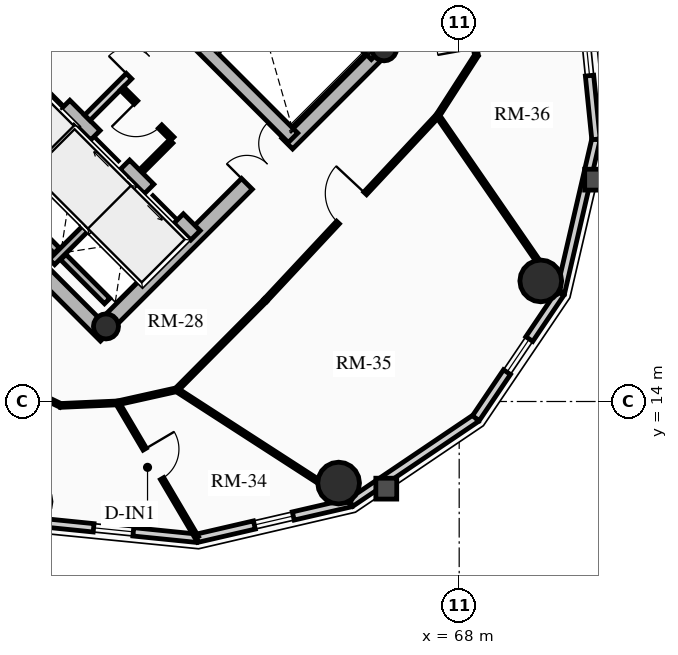
"""IFC4 building model, lengths in metres.
Left out: names, types, materials, properties, quantities, classifications, styles, units other than length and angle.
Written with IfcOpenShell. Run it as: python <this file> out.ifc"""

import sys

from ifc_helpers import new_model, si_unit, direction, frame, frame_2d, origin, origin_2d, place, context, subcontext, project, spatial, rectangle, circle, hollow_circle, extrude, source, transform, mapped, element, fill, save


model = new_model("IFC4")
c1 = context("Model", 3, precision=1e-05, world=origin(), true_north=direction((0.0, 1.0)))
c2 = subcontext(c1, "Body", "Model", "MODEL_VIEW")
j1 = project(units=[si_unit("LENGTHUNIT", "METRE"), si_unit("PLANEANGLEUNIT", "RADIAN")], contexts=[c1])
p1 = place(None, origin())
s1 = spatial("IfcSite", under=j1, at=p1, CompositionType="ELEMENT")
p2 = place(p1, origin())
s2 = spatial("IfcBuilding", under=s1, at=p2, CompositionType="ELEMENT")
p3 = place(p2, frame((0.0, 0.0, 229.25)))
s3 = spatial("IfcBuildingStorey", under=s2, at=p3, CompositionType="ELEMENT", Elevation=229.25)
for number, where, z_axis, x_axis in (
    (1, (58.702, 15.732, 0.0), (0.0, 0.0, 1.0), (-0.707, 0.707, 0.0)),
    (2, (66.268, 23.298, 0.0), (0.0, 0.0, 1.0), (-0.707, 0.707, 0.0)),
):
    element("IfcWall", number, at=place(p3, frame(where, z_axis=z_axis, x_axis=x_axis)), inside=s3, PredefinedType="SHEAR", context=c2, shape_type="SweptSolid", body=[
        extrude(rectangle(XDim=14.1, YDim=0.4, at=frame_2d((7.05, 0.0))), origin(), (0.0, 0.0, 1.0), 3.2),
    ])
p4 = place(p3, frame((58.561, 15.873, 0.0), z_axis=(0.0, 0.0, 1.0), x_axis=(0.707106781187, 0.707106781187, 0.0)))
e3 = element("IfcWall", 3, at=p4, inside=s3, PredefinedType="SHEAR", context=c2, shape_type="SweptSolid", body=[
    extrude(rectangle(XDim=10.7, YDim=0.4, at=frame_2d((5.35, 0.0))), origin(), (0.0, 0.0, 1.0), 3.2),
])
m1 = source(origin(), c2, "Body", "SweptSolid", [
    extrude(rectangle(XDim=1.5, YDim=2.02, at=frame_2d((0.75, 1.01))), frame((0.0, 0.21, 0.0), z_axis=(0.0, -1.0, 0.0), x_axis=(1.0, 0.0, 0.0)), (0.0, 0.0, 1.0), 0.42),
])
p5 = place(p4, frame((5.45, 0.0, 0.0)))
e4 = element("IfcOpeningElement", 4, at=p5, cuts=e3, PredefinedType="OPENING", context=c2, shape_type="MappedRepresentation", body=[
    mapped(m1, transform((0.0, 0.0, 0.0), x_axis=(1.0, 0.0, 0.0), y_axis=(0.0, 1.0, 0.0), z_axis=(0.0, 0.0, 1.0), scale=1.0)),
])
p6 = place(p3, frame((61.06, 18.373, 0.0), z_axis=(0.0, 0.0, 1.0), x_axis=(-0.707106781187, 0.707106781187, 0.0)))
e5 = element("IfcWall", 5, at=p6, inside=s3, PredefinedType="SHEAR", context=c2, shape_type="SweptSolid", body=[
    extrude(rectangle(XDim=13.7, YDim=0.35, at=frame_2d((6.85, 0.0))), origin(), (0.0, 0.0, 1.0), 3.2),
])
m2 = source(origin(), c2, "Body", "SweptSolid", [
    extrude(rectangle(XDim=1.1, YDim=2.015, at=frame_2d((0.55, 1.007))), frame((0.0, 0.185, 0.0), z_axis=(0.0, -1.0, 0.0), x_axis=(1.0, 0.0, 0.0)), (0.0, 0.0, 1.0), 0.37),
])
p7 = place(p6, frame((4.85, 0.0, 0.0)))
e6 = element("IfcOpeningElement", 6, at=p7, cuts=e5, PredefinedType="OPENING", context=c2, shape_type="MappedRepresentation", body=[
    mapped(m2, transform((0.0, 0.0, 0.0), x_axis=(1.0, 0.0, 0.0), y_axis=(0.0, 1.0, 0.0), z_axis=(0.0, 0.0, 1.0), scale=1.0)),
])
p8 = place(p6, frame((0.625, 0.0, 0.0)))
e7 = element("IfcOpeningElement", 7, at=p8, cuts=e5, PredefinedType="OPENING", context=c2, shape_type="MappedRepresentation", body=[
    mapped(m2, transform((0.0, 0.0, 0.0), x_axis=(1.0, 0.0, 0.0), y_axis=(0.0, 1.0, 0.0), z_axis=(0.0, 0.0, 1.0), scale=1.0)),
])
p9 = place(p6, frame((2.625, 0.0, 0.0)))
e8 = element("IfcOpeningElement", 8, at=p9, cuts=e5, PredefinedType="OPENING", context=c2, shape_type="MappedRepresentation", body=[
    mapped(m2, transform((0.0, 0.0, 0.0), x_axis=(1.0, 0.0, 0.0), y_axis=(0.0, 1.0, 0.0), z_axis=(0.0, 0.0, 1.0), scale=1.0)),
])
m3 = source(origin(), c2, "Body", "SweptSolid", [
    extrude(rectangle(XDim=1.15, YDim=2.02, at=frame_2d((0.575, 1.01))), frame((0.0, 0.185, 0.0), z_axis=(0.0, -1.0, 0.0), x_axis=(1.0, 0.0, 0.0)), (0.0, 0.0, 1.0), 0.37),
])
p10 = place(p6, frame((7.27, 0.0, 0.0)))
e9 = element("IfcOpeningElement", 9, at=p10, cuts=e5, PredefinedType="OPENING", context=c2, shape_type="MappedRepresentation", body=[
    mapped(m3, transform((0.0, 0.0, 0.0), x_axis=(1.0, 0.0, 0.0), y_axis=(0.0, 1.0, 0.0), z_axis=(0.0, 0.0, 1.0), scale=1.0)),
])
p11 = place(p3, frame((63.627, 20.94, 0.0), z_axis=(0.0, 0.0, 1.0), x_axis=(-0.707119496762, 0.707094065383, 0.0)))
e10 = element("IfcWall", 10, at=p11, inside=s3, PredefinedType="SHEAR", context=c2, shape_type="SweptSolid", body=[
    extrude(rectangle(XDim=9.6, YDim=0.35, at=frame_2d((4.8, 0.0))), origin(), (0.0, 0.0, 1.0), 3.2),
])
p12 = place(p11, frame((5.28, 0.0, 0.0)))
e11 = element("IfcOpeningElement", 11, at=p12, cuts=e10, PredefinedType="OPENING", context=c2, shape_type="MappedRepresentation", body=[
    mapped(m3, transform((0.0, 0.0, 0.0), x_axis=(1.0, 0.0, 0.0), y_axis=(0.0, 1.0, 0.0), z_axis=(0.0, 0.0, 1.0), scale=1.0)),
])
p13 = place(p3, frame((65.812, 23.125, 0.0), z_axis=(0.0, 0.0, 1.0), x_axis=(-0.707106781187, 0.707106781187, 0.0)))
e12 = element("IfcWall", 12, at=p13, inside=s3, PredefinedType="SHEAR", context=c2, shape_type="SweptSolid", body=[
    extrude(rectangle(XDim=6.695, YDim=0.35, at=frame_2d((3.348, 0.0))), origin(), (0.0, 0.0, 1.0), 3.2),
])
for number, where, z_axis, x_axis in (
    (13, (58.706, 15.976, 0.0), (0.0, 0.0, 1.0), (0.707, 0.707, 0.0)),
    (14, (66.024, 23.294, 0.0), (0.0, 0.0, 1.0), (0.707, 0.707, 0.0)),
):
    element("IfcColumn", number, at=place(p3, frame(where, z_axis=z_axis, x_axis=x_axis)), inside=s3, PredefinedType="COLUMN", context=c2, shape_type="SweptSolid", body=[
        extrude(hollow_circle(Radius=0.33, WallThickness=0.025, at=origin_2d()), origin(), (0.0, 0.0, 1.0), 3.2),
    ])
for number, where, z_axis, x_axis in (
    (15, (64.827, 11.854, 0.0), (0.0, 0.0, 1.0), (1.0, 0.0, 0.0)),
    (16, (70.146, 17.173, 0.0), (0.0, 0.0, 1.0), (1.0, 0.0, 0.0)),
):
    element("IfcColumn", number, at=place(p3, frame(where, z_axis=z_axis, x_axis=x_axis)), inside=s3, PredefinedType="USERDEFINED", context=c2, shape_type="SweptSolid", body=[
        extrude(circle(Radius=0.55, at=origin_2d()), origin(), (0.0, 0.0, 1.0), 3.2),
    ])
p14 = place(p3, frame((61.1, 10.401, 0.0), z_axis=(0.0, 0.0, 1.0), x_axis=(-0.994929930991, 0.100570534541, 0.0)))
e17 = element("IfcWall", 17, at=p14, inside=s3, PredefinedType="SOLIDWALL", context=c2, shape_type="SweptSolid", body=[
    extrude(rectangle(XDim=4.418, YDim=0.22, at=frame_2d((2.209, 0.0))), origin(), (0.0, 0.0, 1.0), 2.612),
])
m4 = source(origin(), c2, "Body", "SweptSolid", [
    extrude(rectangle(XDim=1.05, YDim=1.3, at=frame_2d((0.525, 0.65))), frame((0.0, 0.12, 0.0), z_axis=(0.0, -1.0, 0.0), x_axis=(1.0, 0.0, 0.0)), (0.0, 0.0, 1.0), 0.24),
])
p15 = place(p14, frame((1.684, 0.0, 0.65)))
e18 = element("IfcOpeningElement", 18, at=p15, cuts=e17, PredefinedType="OPENING", context=c2, shape_type="MappedRepresentation", body=[
    mapped(m4, transform((0.0, 0.0, 0.0), x_axis=(1.0, 0.0, 0.0), y_axis=(0.0, 1.0, 0.0), z_axis=(0.0, 0.0, 1.0), scale=1.0)),
])
p16 = place(p3, frame((65.144, 11.337, 0.0), z_axis=(0.0, 0.0, 1.0), x_axis=(-0.974249228678, -0.225473813158, 0.0)))
e19 = element("IfcWall", 19, at=p16, inside=s3, PredefinedType="SOLIDWALL", context=c2, shape_type="SweptSolid", body=[
    extrude(rectangle(XDim=4.15, YDim=0.22, at=frame_2d((2.075, 0.0))), origin(), (0.0, 0.0, 1.0), 2.612),
])
p17 = place(p16, frame((1.55, 0.0, 0.65)))
e20 = element("IfcOpeningElement", 20, at=p17, cuts=e19, PredefinedType="OPENING", context=c2, shape_type="MappedRepresentation", body=[
    mapped(m4, transform((0.0, 0.0, 0.0), x_axis=(1.0, 0.0, 0.0), y_axis=(0.0, 1.0, 0.0), z_axis=(0.0, 0.0, 1.0), scale=1.0)),
])
p18 = place(p3, frame((68.439, 13.561, 0.0), z_axis=(0.0, 0.0, 1.0), x_axis=(-0.828833723692, -0.559495003079, 0.0)))
e21 = element("IfcWall", 21, at=p18, inside=s3, PredefinedType="SOLIDWALL", context=c2, shape_type="SweptSolid", body=[
    extrude(rectangle(XDim=3.976, YDim=0.22, at=frame_2d((1.988, 0.0))), origin(), (0.0, 0.0, 1.0), 2.612),
])
p19 = place(p3, frame((70.663, 16.856, 0.0), z_axis=(0.0, 0.0, 1.0), x_axis=(-0.559495003079, -0.828833723692, 0.0)))
e22 = element("IfcWall", 22, at=p19, inside=s3, PredefinedType="SOLIDWALL", context=c2, shape_type="SweptSolid", body=[
    extrude(rectangle(XDim=3.976, YDim=0.22, at=frame_2d((1.988, 0.0))), origin(), (0.0, 0.0, 1.0), 2.612),
])
p20 = place(p19, frame((1.463, 0.0, 0.65)))
e23 = element("IfcOpeningElement", 23, at=p20, cuts=e22, PredefinedType="OPENING", context=c2, shape_type="MappedRepresentation", body=[
    mapped(m4, transform((0.0, 0.0, 0.0), x_axis=(1.0, 0.0, 0.0), y_axis=(0.0, 1.0, 0.0), z_axis=(0.0, 0.0, 1.0), scale=1.0)),
])
p21 = place(p3, frame((71.599, 20.9, 0.0), z_axis=(0.0, 0.0, 1.0), x_axis=(-0.225473813158, -0.974249228678, 0.0)))
e24 = element("IfcWall", 24, at=p21, inside=s3, PredefinedType="SOLIDWALL", context=c2, shape_type="SweptSolid", body=[
    extrude(rectangle(XDim=4.15, YDim=0.22, at=frame_2d((2.075, 0.0))), origin(), (0.0, 0.0, 1.0), 2.612),
])
p22 = place(p3, frame((71.155, 25.295, 0.0), z_axis=(0.0, 0.0, 1.0), x_axis=(0.100570534541, -0.994929930991, 0.0)))
e25 = element("IfcWall", 25, at=p22, inside=s3, PredefinedType="SOLIDWALL", context=c2, shape_type="SweptSolid", body=[
    extrude(rectangle(XDim=4.418, YDim=0.22, at=frame_2d((2.209, 0.0))), origin(), (0.0, 0.0, 1.0), 2.612),
])
p23 = place(p22, frame((1.684, 0.0, 0.65)))
e26 = element("IfcOpeningElement", 26, at=p23, cuts=e25, PredefinedType="OPENING", context=c2, shape_type="MappedRepresentation", body=[
    mapped(m4, transform((0.0, 0.0, 0.0), x_axis=(1.0, 0.0, 0.0), y_axis=(0.0, 1.0, 0.0), z_axis=(0.0, 0.0, 1.0), scale=1.0)),
])
p24 = place(p3, frame((55.888, 19.069, 0.0), z_axis=(0.0, 0.0, 1.0), x_axis=(0.707106781187, 0.707106781187, 0.0)))
e27 = element("IfcWall", 27, at=p24, inside=s3, PredefinedType="SHEAR", context=c2, shape_type="SweptSolid", body=[
    extrude(rectangle(XDim=2.97, YDim=0.2, at=frame_2d((1.485, 0.0))), origin(), (0.0, 0.0, 1.0), 3.2),
])
p25 = place(p3, frame((57.284, 17.673, 0.0), z_axis=(0.0, 0.0, 1.0), x_axis=(0.707147878904, 0.70706568108, 0.0)))
e28 = element("IfcWall", 28, at=p25, inside=s3, PredefinedType="SHEAR", context=c2, shape_type="SweptSolid", body=[
    extrude(rectangle(XDim=2.97, YDim=0.2, at=frame_2d((1.485, 0.0))), origin(), (0.0, 0.0, 1.0), 3.2),
])
p26 = place(p3, frame((57.412, 17.97, 0.0), z_axis=(0.0, 0.0, 1.0), x_axis=(-0.707106781187, 0.707106781187, 0.0)))
e29 = element("IfcWall", 29, at=p26, inside=s3, PredefinedType="SHEAR", context=c2, shape_type="SweptSolid", body=[
    extrude(rectangle(XDim=1.735, YDim=0.2, at=frame_2d((0.867, 0.0))), origin(), (0.0, 0.0, 1.0), 3.2),
])
p27 = place(p3, frame((58.737, 16.644, 0.0), z_axis=(0.0, 0.0, 1.0), x_axis=(-0.707032117043, 0.707181437447, 0.0)))
e30 = element("IfcWall", 30, at=p27, inside=s3, PredefinedType="SHEAR", context=c2, shape_type="SweptSolid", body=[
    extrude(rectangle(XDim=1.635, YDim=0.2, at=frame_2d((0.817, 0.0))), origin(), (0.0, 0.0, 1.0), 3.2),
])
p28 = place(p3, frame((58.214, 21.467, 0.0), z_axis=(0.0, 0.0, 1.0), x_axis=(0.707106781187, 0.707106781187, 0.0)))
e31 = element("IfcWall", 31, at=p28, inside=s3, PredefinedType="PARTITIONING", context=c2, shape_type="SweptSolid", body=[
    extrude(rectangle(XDim=3.28, YDim=0.2, at=frame_2d((1.64, 0.0))), origin(), (0.0, 0.0, 1.0), 2.975),
])
m5 = source(origin(), c2, "Body", "SweptSolid", [
    extrude(rectangle(XDim=1.5, YDim=2.02, at=frame_2d((0.75, 1.01))), frame((0.0, 0.11, 0.0), z_axis=(0.0, -1.0, 0.0), x_axis=(1.0, 0.0, 0.0)), (0.0, 0.0, 1.0), 0.22),
])
p29 = place(p28, frame((1.55, 0.0, 0.0)))
e32 = element("IfcOpeningElement", 32, at=p29, cuts=e31, PredefinedType="OPENING", context=c2, shape_type="MappedRepresentation", body=[
    mapped(m5, transform((0.0, 0.0, 0.0), x_axis=(1.0, 0.0, 0.0), y_axis=(0.0, 1.0, 0.0), z_axis=(0.0, 0.0, 1.0), scale=1.0)),
])
p30 = place(p3, frame((60.448, 20.915, 0.0), z_axis=(0.0, 0.0, 1.0), x_axis=(-0.707106781187, 0.707106781187, 0.0)))
e33 = element("IfcWall", 33, at=p30, inside=s3, PredefinedType="PARTITIONING", context=c2, shape_type="SweptSolid", body=[
    extrude(rectangle(XDim=1.87, YDim=0.125, at=frame_2d((0.935, 0.0))), origin(), (0.0, 0.0, 1.0), 2.975),
])
m6 = source(origin(), c2, "Body", "SweptSolid", [
    extrude(rectangle(XDim=0.9, YDim=2.005, at=frame_2d((0.45, 1.002))), frame((0.0, 0.073, 0.0), z_axis=(0.0, -1.0, 0.0), x_axis=(1.0, 0.0, 0.0)), (0.0, 0.0, 1.0), 0.145),
])
p31 = place(p30, frame((0.45, 0.0, 0.0)))
e34 = element("IfcOpeningElement", 34, at=p31, cuts=e33, PredefinedType="OPENING", context=c2, shape_type="MappedRepresentation", body=[
    mapped(m6, transform((0.0, 0.0, 0.0), x_axis=(1.0, 0.0, 0.0), y_axis=(0.0, 1.0, 0.0), z_axis=(0.0, 0.0, 1.0), scale=1.0)),
])
p32 = place(p3, frame((59.643, 20.066, 0.0), z_axis=(0.0, 0.0, 1.0), x_axis=(0.707106781187, 0.707106781187, 0.0)))
e35 = element("IfcWall", 35, at=p32, inside=s3, PredefinedType="PARTITIONING", context=c2, shape_type="SweptSolid", body=[
    extrude(rectangle(XDim=1.1, YDim=0.125, at=frame_2d((0.55, 0.0))), origin(), (0.0, 0.0, 1.0), 2.975),
])
p33 = place(p3, frame((56.227, 14.513, 0.0), z_axis=(0.0, 0.0, 1.0), x_axis=(0.901477579283, -0.432825801044, 0.0)))
e36 = element("IfcWall", 36, at=p33, inside=s3, PredefinedType="MOVABLE", context=c2, shape_type="SweptSolid", body=[
    extrude(rectangle(XDim=1.424, YDim=0.1, at=frame_2d((0.712, 0.0))), origin(), (0.0, 0.0, 1.0), 2.545),
])
p34 = place(p3, frame((57.511, 13.897, 0.0), z_axis=(0.0, 0.0, 1.0), x_axis=(0.999024538494, 0.044158481476, 0.0)))
e37 = element("IfcWall", 37, at=p34, inside=s3, PredefinedType="MOVABLE", context=c2, shape_type="SweptSolid", body=[
    extrude(rectangle(XDim=1.498, YDim=0.1, at=frame_2d((0.749, 0.0))), origin(), (0.0, 0.0, 1.0), 2.612),
])
p35 = place(p3, frame((59.008, 13.963, 0.0), z_axis=(0.0, 0.0, 1.0), x_axis=(0.976020856791, 0.21767702476, 0.0)))
e38 = element("IfcWall", 38, at=p35, inside=s3, PredefinedType="MOVABLE", context=c2, shape_type="SweptSolid", body=[
    extrude(rectangle(XDim=1.593, YDim=0.1, at=frame_2d((0.796, 0.0))), origin(), (0.0, 0.0, 1.0), 2.545),
])
p36 = place(p3, frame((60.562, 14.31, 0.0), z_axis=(0.0, 0.0, 1.0), x_axis=(0.704566236161, 0.709638230975, 0.0)))
e39 = element("IfcWall", 39, at=p36, inside=s3, PredefinedType="MOVABLE", context=c2, shape_type="SweptSolid", body=[
    extrude(rectangle(XDim=3.321, YDim=0.1, at=frame_2d((1.661, 0.0))), origin(), (0.0, 0.0, 1.0), 2.612),
])
p37 = place(p3, frame((62.903, 16.667, 0.0), z_axis=(0.0, 0.0, 1.0), x_axis=(0.682371947497, 0.731005147225, 0.0)))
e40 = element("IfcWall", 40, at=p37, inside=s3, PredefinedType="MOVABLE", context=c2, shape_type="SweptSolid", body=[
    extrude(rectangle(XDim=6.642, YDim=0.1, at=frame_2d((3.321, 0.0))), origin(), (0.0, 0.0, 1.0), 2.545),
])
m7 = source(origin(), c2, "Body", "SweptSolid", [
    extrude(rectangle(XDim=1.05, YDim=2.015, at=frame_2d((0.525, 1.007))), frame((0.0, 0.06, 0.0), z_axis=(0.0, -1.0, 0.0), x_axis=(1.0, 0.0, 0.0)), (0.0, 0.0, 1.0), 0.12),
])
p38 = place(p37, frame((2.796, 0.0, 0.0)))
e41 = element("IfcOpeningElement", 41, at=p38, cuts=e40, PredefinedType="OPENING", context=c2, shape_type="MappedRepresentation", body=[
    mapped(m7, transform((0.0, 0.0, 0.0), x_axis=(1.0, 0.0, 0.0), y_axis=(0.0, 1.0, 0.0), z_axis=(0.0, 0.0, 1.0), scale=1.0)),
])
p39 = place(p3, frame((67.435, 21.521, 0.0), z_axis=(0.0, 0.0, 1.0), x_axis=(0.540777197838, 0.841165870859, 0.0)))
e42 = element("IfcWall", 42, at=p39, inside=s3, PredefinedType="MOVABLE", context=c2, shape_type="SweptSolid", body=[
    extrude(rectangle(XDim=1.888, YDim=0.1, at=frame_2d((0.944, 0.0))), origin(), (0.0, 0.0, 1.0), 2.545),
])
p40 = place(p3, frame((68.456, 23.11, 0.0), z_axis=(0.0, 0.0, 1.0), x_axis=(-0.1772522795, 0.984165448191, 0.0)))
e43 = element("IfcWall", 43, at=p40, inside=s3, PredefinedType="MOVABLE", context=c2, shape_type="SweptSolid", body=[
    extrude(rectangle(XDim=1.382, YDim=0.1, at=frame_2d((0.691, 0.0))), origin(), (0.0, 0.0, 1.0), 2.612),
])
m8 = source(origin(), c2, "Body", "SweptSolid", [
    extrude(rectangle(XDim=1.0, YDim=2.015, at=frame_2d((0.5, 1.007))), frame((0.0, 0.06, 0.0), z_axis=(0.0, -1.0, 0.0), x_axis=(1.0, 0.0, 0.0)), (0.0, 0.0, 1.0), 0.12),
])
p41 = place(p40, frame((0.191, 0.0, 0.0)))
e44 = element("IfcOpeningElement", 44, at=p41, cuts=e43, PredefinedType="OPENING", context=c2, shape_type="MappedRepresentation", body=[
    mapped(m8, transform((0.0, 0.0, 0.0), x_axis=(1.0, 0.0, 0.0), y_axis=(0.0, 1.0, 0.0), z_axis=(0.0, 0.0, 1.0), scale=1.0)),
])
p42 = place(p3, frame((60.562, 14.31, 0.0), z_axis=(0.0, 0.0, 1.0), x_axis=(0.839858797161, -0.542804938105, 0.0)))
e45 = element("IfcWall", 45, at=p42, inside=s3, PredefinedType="MOVABLE", context=c2, shape_type="SweptSolid", body=[
    extrude(rectangle(XDim=5.444, YDim=0.1, at=frame_2d((2.722, 0.0))), origin(), (0.0, 0.0, 1.0), 2.612),
])
p43 = place(p3, frame((67.435, 21.521, 0.0), z_axis=(0.0, 0.0, 1.0), x_axis=(0.567700677576, -0.823235045828, 0.0)))
e46 = element("IfcWall", 46, at=p43, inside=s3, PredefinedType="MOVABLE", context=c2, shape_type="SweptSolid", body=[
    extrude(rectangle(XDim=5.656, YDim=0.1, at=frame_2d((2.828, 0.0))), origin(), (0.0, 0.0, 1.0), 2.612),
])
p44 = place(p3, frame((59.008, 13.963, 0.0), z_axis=(0.0, 0.0, 1.0), x_axis=(0.508047134864, -0.86132926849, 0.0)))
e47 = element("IfcWall", 47, at=p44, inside=s3, PredefinedType="MOVABLE", context=c2, shape_type="SweptSolid", body=[
    extrude(rectangle(XDim=4.113, YDim=0.1, at=frame_2d((2.056, 0.0))), origin(), (0.0, 0.0, 1.0), 2.545),
])
m9 = source(origin(), c2, "Body", "SweptSolid", [
    extrude(rectangle(XDim=0.9, YDim=2.005, at=frame_2d((0.45, 1.002))), frame((0.0, 0.06, 0.0), z_axis=(0.0, -1.0, 0.0), x_axis=(1.0, 0.0, 0.0)), (0.0, 0.0, 1.0), 0.12),
])
p45 = place(p44, frame((1.413, 0.0, 0.0)))
e48 = element("IfcOpeningElement", 48, at=p45, cuts=e47, PredefinedType="OPENING", context=c2, shape_type="MappedRepresentation", body=[
    mapped(m9, transform((0.0, 0.0, 0.0), x_axis=(1.0, 0.0, 0.0), y_axis=(0.0, 1.0, 0.0), z_axis=(0.0, 0.0, 1.0), scale=1.0)),
])
m10 = source(origin(), c2, "Body", "SweptSolid", [
    extrude(rectangle(XDim=1.05, YDim=1.3, at=frame_2d((0.525, 0.65))), frame((0.0, 0.03, 0.0), z_axis=(0.0, -1.0, 0.0), x_axis=(1.0, 0.0, 0.0)), (0.0, 0.0, 1.0), 0.06),
])
p46 = place(p15, origin())
e49 = element("IfcWindow", 49, at=p46, inside=s3, PartitioningType="SINGLE_PANEL", PredefinedType="WINDOW", context=c2, shape_type="MappedRepresentation", body=[
    mapped(m10, transform((0.0, 0.0, 0.0), x_axis=(1.0, 0.0, 0.0), y_axis=(0.0, 1.0, 0.0), z_axis=(0.0, 0.0, 1.0), scale=1.0)),
])
fill(e18, e49)
p47 = place(p17, origin())
e50 = element("IfcWindow", 50, at=p47, inside=s3, PartitioningType="SINGLE_PANEL", PredefinedType="WINDOW", context=c2, shape_type="MappedRepresentation", body=[
    mapped(m10, transform((0.0, 0.0, 0.0), x_axis=(1.0, 0.0, 0.0), y_axis=(0.0, 1.0, 0.0), z_axis=(0.0, 0.0, 1.0), scale=1.0)),
])
fill(e20, e50)
p48 = place(p20, origin())
e51 = element("IfcWindow", 51, at=p48, inside=s3, PartitioningType="SINGLE_PANEL", PredefinedType="WINDOW", context=c2, shape_type="MappedRepresentation", body=[
    mapped(m10, transform((0.0, 0.0, 0.0), x_axis=(1.0, 0.0, 0.0), y_axis=(0.0, 1.0, 0.0), z_axis=(0.0, 0.0, 1.0), scale=1.0)),
])
fill(e23, e51)
p49 = place(p23, origin())
e52 = element("IfcWindow", 52, at=p49, inside=s3, PartitioningType="SINGLE_PANEL", PredefinedType="WINDOW", context=c2, shape_type="MappedRepresentation", body=[
    mapped(m10, transform((0.0, 0.0, 0.0), x_axis=(1.0, 0.0, 0.0), y_axis=(0.0, 1.0, 0.0), z_axis=(0.0, 0.0, 1.0), scale=1.0)),
])
fill(e26, e52)
m11 = source(origin(), c2, "Body", "SweptSolid", [
    extrude(rectangle(XDim=1.1, YDim=2.015, at=frame_2d((0.55, 1.007))), frame((0.0, 0.025, 0.0), z_axis=(0.0, -1.0, 0.0), x_axis=(1.0, 0.0, 0.0)), (0.0, 0.0, 1.0), 0.05),
])
p50 = place(p7, origin())
e53 = element("IfcDoor", 53, at=p50, inside=s3, OperationType="SLIDING_TO_LEFT", PredefinedType="DOOR", context=c2, shape_type="MappedRepresentation", body=[
    mapped(m11, transform((0.0, 0.0, 0.0), x_axis=(1.0, 0.0, 0.0), y_axis=(0.0, 1.0, 0.0), z_axis=(0.0, 0.0, 1.0), scale=1.0)),
])
fill(e6, e53)
p51 = place(p8, origin())
e54 = element("IfcDoor", 54, at=p51, inside=s3, OperationType="SLIDING_TO_LEFT", PredefinedType="DOOR", context=c2, shape_type="MappedRepresentation", body=[
    mapped(m11, transform((0.0, 0.0, 0.0), x_axis=(1.0, 0.0, 0.0), y_axis=(0.0, 1.0, 0.0), z_axis=(0.0, 0.0, 1.0), scale=1.0)),
])
fill(e7, e54)
p52 = place(p9, origin())
e55 = element("IfcDoor", 55, at=p52, inside=s3, OperationType="SLIDING_TO_RIGHT", PredefinedType="DOOR", context=c2, shape_type="MappedRepresentation", body=[
    mapped(m11, transform((0.0, 0.0, 0.0), x_axis=(1.0, 0.0, 0.0), y_axis=(0.0, 1.0, 0.0), z_axis=(0.0, 0.0, 1.0), scale=1.0)),
])
fill(e8, e55)
m12 = source(origin(), c2, "Body", "SweptSolid", [
    extrude(rectangle(XDim=1.5, YDim=2.02, at=frame_2d((0.75, 1.01))), frame((0.0, 0.025, 0.0), z_axis=(0.0, -1.0, 0.0), x_axis=(1.0, 0.0, 0.0)), (0.0, 0.0, 1.0), 0.05),
])
p53 = place(p5, origin())
e56 = element("IfcDoor", 56, at=p53, inside=s3, OperationType="DOUBLE_DOOR_SINGLE_SWING", PredefinedType="DOOR", context=c2, shape_type="MappedRepresentation", body=[
    mapped(m12, transform((0.0, 0.0, 0.0), x_axis=(1.0, 0.0, 0.0), y_axis=(0.0, 1.0, 0.0), z_axis=(0.0, 0.0, 1.0), scale=1.0)),
])
fill(e4, e56)
p54 = place(p29, origin())
e57 = element("IfcDoor", 57, at=p54, inside=s3, OperationType="DOUBLE_DOOR_SINGLE_SWING", PredefinedType="DOOR", context=c2, shape_type="MappedRepresentation", body=[
    mapped(m12, transform((0.0, 0.0, 0.0), x_axis=(1.0, 0.0, 0.0), y_axis=(0.0, 1.0, 0.0), z_axis=(0.0, 0.0, 1.0), scale=1.0)),
])
fill(e32, e57)
m13 = source(origin(), c2, "Body", "SweptSolid", [
    extrude(rectangle(XDim=0.9, YDim=2.005, at=frame_2d((0.45, 1.002))), frame((0.0, 0.025, 0.0), z_axis=(0.0, -1.0, 0.0), x_axis=(1.0, 0.0, 0.0)), (0.0, 0.0, 1.0), 0.05),
])
p55 = place(p31, origin())
e58 = element("IfcDoor", 58, at=p55, inside=s3, OperationType="SINGLE_SWING_RIGHT", PredefinedType="DOOR", context=c2, shape_type="MappedRepresentation", body=[
    mapped(m13, transform((0.0, 0.0, 0.0), x_axis=(1.0, 0.0, 0.0), y_axis=(0.0, 1.0, 0.0), z_axis=(0.0, 0.0, 1.0), scale=1.0)),
])
fill(e34, e58)
p56 = place(p45, origin())
e59 = element("IfcDoor", 59, at=p56, inside=s3, OperationType="SINGLE_SWING_LEFT", PredefinedType="DOOR", context=c2, shape_type="MappedRepresentation", body=[
    mapped(m13, transform((0.0, 0.0, 0.0), x_axis=(1.0, 0.0, 0.0), y_axis=(0.0, 1.0, 0.0), z_axis=(0.0, 0.0, 1.0), scale=1.0)),
])
fill(e48, e59)
m14 = source(origin(), c2, "Body", "SweptSolid", [
    extrude(rectangle(XDim=1.05, YDim=2.015, at=frame_2d((0.525, 1.007))), frame((0.0, 0.025, 0.0), z_axis=(0.0, -1.0, 0.0), x_axis=(1.0, 0.0, 0.0)), (0.0, 0.0, 1.0), 0.05),
])
p57 = place(p38, origin())
e60 = element("IfcDoor", 60, at=p57, inside=s3, OperationType="SINGLE_SWING_RIGHT", PredefinedType="DOOR", context=c2, shape_type="MappedRepresentation", body=[
    mapped(m14, transform((0.0, 0.0, 0.0), x_axis=(1.0, 0.0, 0.0), y_axis=(0.0, 1.0, 0.0), z_axis=(0.0, 0.0, 1.0), scale=1.0)),
])
fill(e41, e60)
save(model, sys.argv[1])
